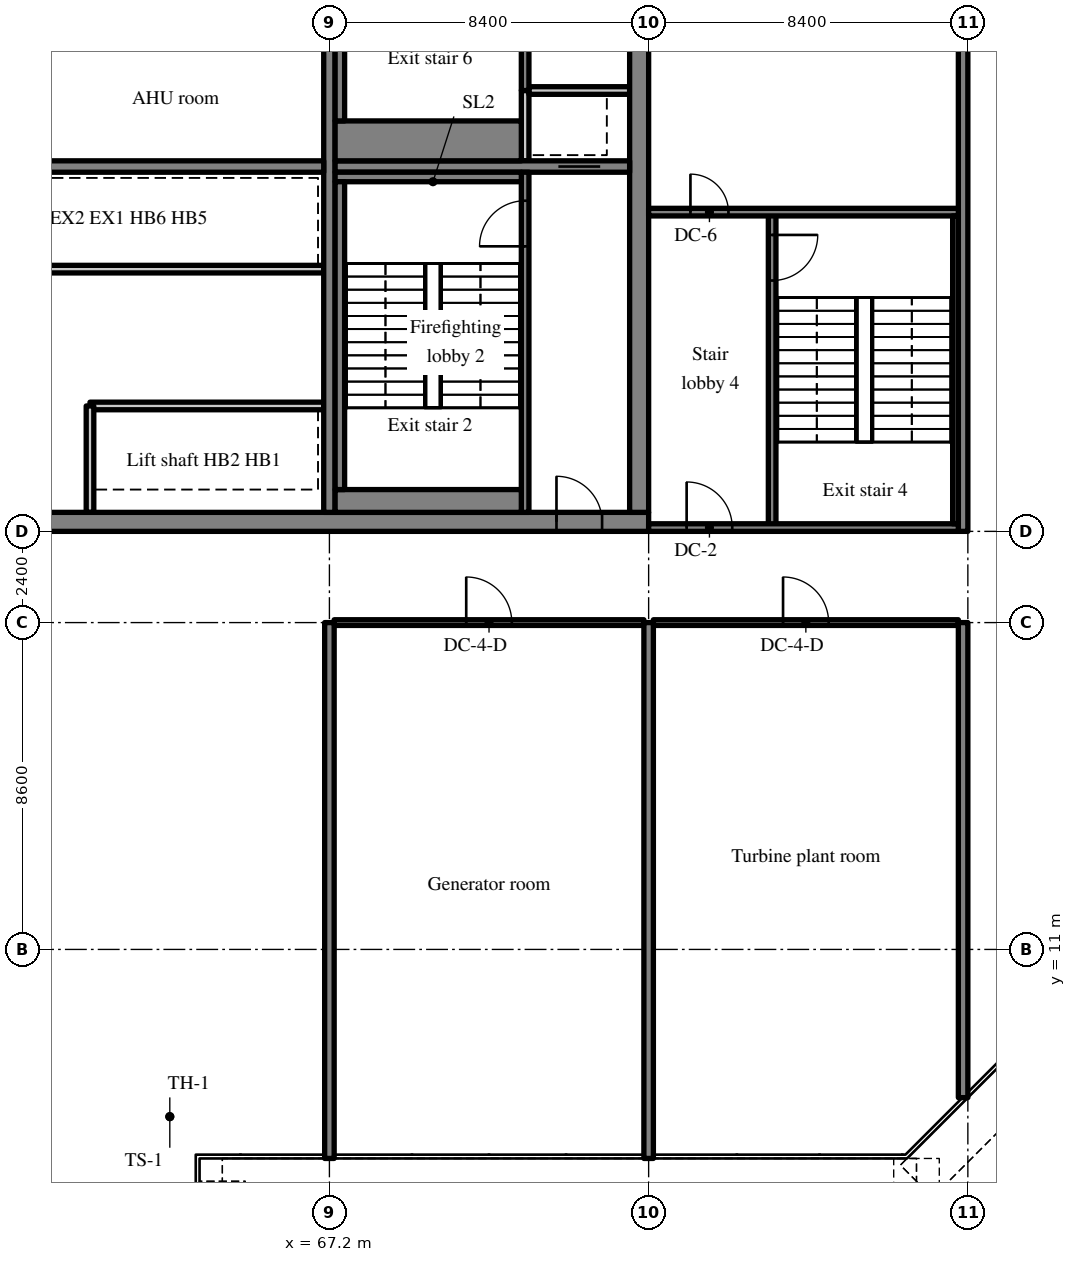
"""IFC4 building model, lengths in metres.
Left out: names, types, materials, properties, quantities, classifications, styles, units other than length and angle.
Written with IfcOpenShell. Run it as: python <this file> out.ifc"""

import sys

from ifc_helpers import new_model, si_unit, direction, frame, frame_2d, origin, place, context, subcontext, project, spatial, rectangle, extrude, source, transform, mapped, element, fill, save


model = new_model("IFC4")
c1 = context("Model", 3, precision=1e-05, world=origin(), true_north=direction((0.0, 1.0)))
c2 = subcontext(c1, "Body", "Model", "MODEL_VIEW")
j1 = project(units=[si_unit("LENGTHUNIT", "METRE"), si_unit("PLANEANGLEUNIT", "RADIAN")], contexts=[c1])
p1 = place(None, origin())
s1 = spatial("IfcSite", under=j1, at=p1, CompositionType="ELEMENT")
p2 = place(p1, origin())
s2 = spatial("IfcBuilding", under=s1, at=p2, CompositionType="ELEMENT")
p3 = place(p2, frame((0.0, 0.0, 317.7)))
s3 = spatial("IfcBuildingStorey", under=s2, at=p3, CompositionType="ELEMENT", Elevation=317.7)
m1 = source(origin(), c2, "Body", "SweptSolid", [
    extrude(rectangle(XDim=50.4, YDim=0.5, at=frame_2d((25.2, 0.0))), origin(), (0.0, 0.0, 1.0), 5.72),
])
p4 = place(p3, frame((25.2, 22.25, 0.0), z_axis=(0.0, 0.0, 1.0), x_axis=(1.0, 0.0, 0.0)))
e1 = element("IfcWall", 1, at=p4, inside=s3, PredefinedType="SHEAR", context=c2, shape_type="MappedRepresentation", body=[
    mapped(m1, transform((0.0, 0.0, 0.0), scale=1.0)),
])
m2 = source(origin(), c2, "Body", "SweptSolid", [
    extrude(rectangle(XDim=1.8, YDim=2.1, at=frame_2d((0.9, 1.05))), frame((0.0, 0.26, 0.0), z_axis=(0.0, -1.0, 0.0), x_axis=(1.0, 0.0, 0.0)), (0.0, 0.0, 1.0), 0.52),
])
p5 = place(p4, frame((15.9, 0.0, 0.0)))
e2 = element("IfcOpeningElement", 2, at=p5, cuts=e1, PredefinedType="OPENING", context=c2, shape_type="MappedRepresentation", body=[
    mapped(m2, transform((0.0, 0.0, 0.0), scale=1.0)),
])
m3 = source(origin(), c2, "Body", "SweptSolid", [
    extrude(rectangle(XDim=0.9, YDim=2.1, at=frame_2d((0.45, 1.05))), frame((0.0, 0.26, 0.0), z_axis=(0.0, -1.0, 0.0), x_axis=(1.0, 0.0, 0.0)), (0.0, 0.0, 1.0), 0.52),
])
p6 = place(p4, frame((21.525, 0.0, 0.0)))
e3 = element("IfcOpeningElement", 3, at=p6, cuts=e1, PredefinedType="OPENING", context=c2, shape_type="MappedRepresentation", body=[
    mapped(m3, transform((0.0, 0.0, 0.0), scale=1.0)),
])
p7 = place(p4, frame((32.7, 0.0, 0.0)))
e4 = element("IfcOpeningElement", 4, at=p7, cuts=e1, PredefinedType="OPENING", context=c2, shape_type="MappedRepresentation", body=[
    mapped(m2, transform((0.0, 0.0, 0.0), scale=1.0)),
])
m4 = source(origin(), c2, "Body", "SweptSolid", [
    extrude(rectangle(XDim=1.2, YDim=2.1, at=frame_2d((0.6, 1.05))), frame((0.0, 0.26, 0.0), z_axis=(0.0, -1.0, 0.0), x_axis=(1.0, 0.0, 0.0)), (0.0, 0.0, 1.0), 0.52),
])
p8 = place(p4, frame((6.5, 0.0, 0.0)))
e5 = element("IfcOpeningElement", 5, at=p8, cuts=e1, PredefinedType="OPENING", context=c2, shape_type="MappedRepresentation", body=[
    mapped(m4, transform((0.0, 0.0, 0.0), scale=1.0)),
])
p9 = place(p4, frame((47.975, 0.0, 0.0)))
e6 = element("IfcOpeningElement", 6, at=p9, cuts=e1, PredefinedType="OPENING", context=c2, shape_type="MappedRepresentation", body=[
    mapped(m4, transform((0.0, 0.0, 0.0), scale=1.0)),
])
m5 = source(origin(), c2, "Body", "SweptSolid", [
    extrude(rectangle(XDim=19.0, YDim=0.5, at=frame_2d((9.5, 0.0))), origin(), (0.0, 0.0, 1.0), 5.72),
])
p10 = place(p3, frame((75.35, 22.5, 0.0), z_axis=(0.0, 0.0, 1.0), x_axis=(0.0, 1.0, 0.0)))
e7 = element("IfcWall", 7, at=p10, inside=s3, PredefinedType="SHEAR", context=c2, shape_type="MappedRepresentation", body=[
    mapped(m5, transform((0.0, 0.0, 0.0), scale=1.0)),
])
p11 = place(p10, frame((12.9, 0.0, 0.0)))
e8 = element("IfcOpeningElement", 8, at=p11, cuts=e7, PredefinedType="OPENING", context=c2, shape_type="MappedRepresentation", body=[
    mapped(m4, transform((0.0, 0.0, 0.0), scale=1.0)),
])
m6 = source(origin(), c2, "Body", "SweptSolid", [
    extrude(rectangle(XDim=19.0, YDim=0.3, at=frame_2d((9.5, 0.0))), origin(), (0.0, 0.0, 1.0), 5.72),
])
p12 = place(p3, frame((67.2, 22.5, 0.0), z_axis=(0.0, 0.0, 1.0), x_axis=(0.0, 1.0, 0.0)))
e9 = element("IfcWall", 9, at=p12, inside=s3, PredefinedType="SHEAR", context=c2, shape_type="MappedRepresentation", body=[
    mapped(m6, transform((0.0, 0.0, 0.0), scale=1.0)),
])
m7 = source(origin(), c2, "Body", "SweptSolid", [
    extrude(rectangle(XDim=16.5, YDim=0.3, at=frame_2d((8.25, 0.0))), origin(), (0.0, 0.0, 1.0), 5.72),
])
p13 = place(p3, frame((50.55, 31.6, 0.0), z_axis=(0.0, 0.0, 1.0), x_axis=(1.0, 0.0, 0.0)))
e10 = element("IfcWall", 10, at=p13, inside=s3, PredefinedType="SHEAR", context=c2, shape_type="MappedRepresentation", body=[
    mapped(m7, transform((0.0, 0.0, 0.0), scale=1.0)),
])
m8 = source(origin(), c2, "Body", "SweptSolid", [
    extrude(rectangle(XDim=1.0, YDim=2.1, at=frame_2d((0.5, 1.05))), frame((0.0, 0.16, 0.0), z_axis=(0.0, -1.0, 0.0), x_axis=(1.0, 0.0, 0.0)), (0.0, 0.0, 1.0), 0.32),
])
p14 = place(p13, frame((0.625, 0.0, 0.0)))
e11 = element("IfcOpeningElement", 11, at=p14, cuts=e10, PredefinedType="OPENING", context=c2, shape_type="MappedRepresentation", body=[
    mapped(m8, transform((0.0, 0.0, 0.0), scale=1.0)),
])
m9 = source(origin(), c2, "Body", "SweptSolid", [
    extrude(rectangle(XDim=7.75, YDim=0.3, at=frame_2d((3.875, 0.0))), origin(), (0.0, 0.0, 1.0), 5.72),
])
p15 = place(p3, frame((67.35, 31.6, 0.0), z_axis=(0.0, 0.0, 1.0), x_axis=(1.0, 0.0, 0.0)))
e12 = element("IfcWall", 12, at=p15, inside=s3, PredefinedType="SHEAR", context=c2, shape_type="MappedRepresentation", body=[
    mapped(m9, transform((0.0, 0.0, 0.0), scale=1.0)),
])
m10 = source(origin(), c2, "Body", "SweptSolid", [
    extrude(rectangle(XDim=1.1, YDim=2.1, at=frame_2d((0.55, 1.05))), frame((0.0, 0.16, 0.0), z_axis=(0.0, -1.0, 0.0), x_axis=(1.0, 0.0, 0.0)), (0.0, 0.0, 1.0), 0.32),
])
p16 = place(p15, frame((5.875, 0.0, 0.0)))
e13 = element("IfcOpeningElement", 13, at=p16, cuts=e12, PredefinedType="OPENING", context=c2, shape_type="MappedRepresentation", body=[
    mapped(m10, transform((0.0, 0.0, 0.0), scale=1.0)),
])
m11 = source(origin(), c2, "Body", "SweptSolid", [
    extrude(rectangle(XDim=14.1, YDim=0.25, at=frame_2d((7.05, 0.0))), origin(), (0.0, 0.0, 1.0), 5.72),
])
for number, where, z_axis, x_axis in (
    (14, (67.2, 5.5, 0.0), (0.0, 0.0, 1.0), (0.0, 1.0, 0.0)),
    (15, (75.6, 5.5, 0.0), (0.0, 0.0, 1.0), (0.0, 1.0, 0.0)),
):
    element("IfcWall", number, at=place(p3, frame(where, z_axis=z_axis, x_axis=x_axis)), inside=s3, PredefinedType="SHEAR", context=c2, shape_type="MappedRepresentation", body=[
        mapped(m11, transform((0.0, 0.0, 0.0), scale=1.0)),
    ])
m12 = source(origin(), c2, "Body", "SweptSolid", [
    extrude(rectangle(XDim=12.5, YDim=0.25, at=frame_2d((6.25, 0.0))), origin(), (0.0, 0.0, 1.0), 5.72),
])
p17 = place(p3, frame((83.875, 7.1, 0.0), z_axis=(0.0, 0.0, 1.0), x_axis=(0.0, 1.0, 0.0)))
e16 = element("IfcWall", 16, at=p17, inside=s3, PredefinedType="SHEAR", context=c2, shape_type="MappedRepresentation", body=[
    mapped(m12, transform((0.0, 0.0, 0.0), scale=1.0)),
])
m13 = source(origin(), c2, "Body", "SweptSolid", [
    extrude(rectangle(XDim=18.4, YDim=0.25, at=frame_2d((9.2, 0.0))), origin(), (0.0, 0.0, 1.0), 5.72),
])
p18 = place(p3, frame((83.875, 22.0, 0.0), z_axis=(0.0, 0.0, 1.0), x_axis=(0.0, 1.0, 0.0)))
e17 = element("IfcWall", 17, at=p18, inside=s3, PredefinedType="SHEAR", context=c2, shape_type="MappedRepresentation", body=[
    mapped(m13, transform((0.0, 0.0, 0.0), scale=1.0)),
])
m14 = source(origin(), c2, "Body", "SweptSolid", [
    extrude(rectangle(XDim=6.15, YDim=0.2, at=frame_2d((3.075, 0.0))), origin(), (0.0, 0.0, 1.0), 5.72),
])
p19 = place(p3, frame((67.05, 25.3, 0.0), z_axis=(0.0, 0.0, 1.0), x_axis=(-1.0, 0.0, 0.0)))
e18 = element("IfcWall", 18, at=p19, inside=s3, PredefinedType="SOLIDWALL", context=c2, shape_type="MappedRepresentation", body=[
    mapped(m14, transform((0.0, 0.0, 0.0), scale=1.0)),
])
m15 = source(origin(), c2, "Body", "SweptSolid", [
    extrude(rectangle(XDim=12.15, YDim=0.2, at=frame_2d((6.075, 0.0))), origin(), (0.0, 0.0, 1.0), 5.72),
])
p20 = place(p3, frame((67.05, 28.9, 0.0), z_axis=(0.0, 0.0, 1.0), x_axis=(-1.0, 0.0, 0.0)))
e19 = element("IfcWall", 19, at=p20, inside=s3, PredefinedType="SOLIDWALL", context=c2, shape_type="MappedRepresentation", body=[
    mapped(m15, transform((0.0, 0.0, 0.0), scale=1.0)),
])
m16 = source(origin(), c2, "Body", "SweptSolid", [
    extrude(rectangle(XDim=2.8, YDim=0.2, at=frame_2d((1.4, 0.0))), origin(), (0.0, 0.0, 1.0), 5.72),
])
p21 = place(p3, frame((60.9, 22.5, 0.0), z_axis=(0.0, 0.0, 1.0), x_axis=(0.0, 1.0, 0.0)))
e20 = element("IfcWall", 20, at=p21, inside=s3, PredefinedType="SOLIDWALL", context=c2, shape_type="MappedRepresentation", body=[
    mapped(m16, transform((0.0, 0.0, 0.0), scale=1.0)),
])
m17 = source(origin(), c2, "Body", "SweptSolid", [
    extrude(rectangle(XDim=8.95, YDim=0.2, at=frame_2d((4.475, 0.0))), origin(), (0.0, 0.0, 1.0), 5.72),
])
p22 = place(p3, frame((72.35, 22.5, 0.0), z_axis=(0.0, 0.0, 1.0), x_axis=(0.0, 1.0, 0.0)))
e21 = element("IfcWall", 21, at=p22, inside=s3, PredefinedType="SOLIDWALL", context=c2, shape_type="MappedRepresentation", body=[
    mapped(m17, transform((0.0, 0.0, 0.0), scale=1.0)),
])
m18 = source(origin(), c2, "Body", "SweptSolid", [
    extrude(rectangle(XDim=1.2, YDim=2.1, at=frame_2d((0.6, 1.05))), frame((0.0, 0.11, 0.0), z_axis=(0.0, -1.0, 0.0), x_axis=(1.0, 0.0, 0.0)), (0.0, 0.0, 1.0), 0.22),
])
p23 = place(p22, frame((7.0, 0.0, 0.0)))
e22 = element("IfcOpeningElement", 22, at=p23, cuts=e21, PredefinedType="OPENING", context=c2, shape_type="MappedRepresentation", body=[
    mapped(m18, transform((0.0, 0.0, 0.0), scale=1.0)),
])
m19 = source(origin(), c2, "Body", "SweptSolid", [
    extrude(rectangle(XDim=1.85, YDim=0.2, at=frame_2d((0.925, 0.0))), origin(), (0.0, 0.0, 1.0), 5.72),
])
p24 = place(p3, frame((72.35, 31.75, 0.0), z_axis=(0.0, 0.0, 1.0), x_axis=(0.0, 1.0, 0.0)))
e23 = element("IfcWall", 23, at=p24, inside=s3, PredefinedType="SOLIDWALL", context=c2, shape_type="MappedRepresentation", body=[
    mapped(m19, transform((0.0, 0.0, 0.0), scale=1.0)),
])
m20 = source(origin(), c2, "Body", "SweptSolid", [
    extrude(rectangle(XDim=2.65, YDim=0.2, at=frame_2d((1.325, 0.0))), origin(), (0.0, 0.0, 1.0), 5.72),
])
p25 = place(p3, frame((72.45, 33.6, 0.0), z_axis=(0.0, 0.0, 1.0), x_axis=(1.0, 0.0, 0.0)))
e24 = element("IfcWall", 24, at=p25, inside=s3, PredefinedType="SOLIDWALL", context=c2, shape_type="MappedRepresentation", body=[
    mapped(m20, transform((0.0, 0.0, 0.0), scale=1.0)),
])
m21 = source(origin(), c2, "Body", "SweptSolid", [
    extrude(rectangle(XDim=7.9, YDim=0.2, at=frame_2d((3.95, 0.0))), origin(), (0.0, 0.0, 1.0), 5.72),
])
p26 = place(p3, frame((72.35, 33.6, 0.0), z_axis=(0.0, 0.0, 1.0), x_axis=(0.0, 1.0, 0.0)))
e25 = element("IfcWall", 25, at=p26, inside=s3, PredefinedType="SOLIDWALL", context=c2, shape_type="MappedRepresentation", body=[
    mapped(m21, transform((0.0, 0.0, 0.0), scale=1.0)),
])
m22 = source(origin(), c2, "Body", "SweptSolid", [
    extrude(rectangle(XDim=1.8, YDim=2.1, at=frame_2d((0.9, 1.05))), frame((0.0, 0.11, 0.0), z_axis=(0.0, -1.0, 0.0), x_axis=(1.0, 0.0, 0.0)), (0.0, 0.0, 1.0), 0.22),
])
p27 = place(p26, frame((5.3, 0.0, 0.0)))
e26 = element("IfcOpeningElement", 26, at=p27, cuts=e25, PredefinedType="OPENING", context=c2, shape_type="MappedRepresentation", body=[
    mapped(m22, transform((0.0, 0.0, 0.0), scale=1.0)),
])
m23 = source(origin(), c2, "Body", "SweptSolid", [
    extrude(rectangle(XDim=8.3, YDim=0.2, at=frame_2d((4.15, 0.0))), origin(), (0.0, 0.0, 1.0), 5.72),
])
p28 = place(p3, frame((78.85, 22.1, 0.0), z_axis=(0.0, 0.0, 1.0), x_axis=(0.0, 1.0, 0.0)))
e27 = element("IfcWall", 27, at=p28, inside=s3, PredefinedType="SOLIDWALL", context=c2, shape_type="MappedRepresentation", body=[
    mapped(m23, transform((0.0, 0.0, 0.0), scale=1.0)),
])
p29 = place(p28, frame((6.5, 0.0, 0.0)))
e28 = element("IfcOpeningElement", 28, at=p29, cuts=e27, PredefinedType="OPENING", context=c2, shape_type="MappedRepresentation", body=[
    mapped(m18, transform((0.0, 0.0, 0.0), scale=1.0)),
])
m24 = source(origin(), c2, "Body", "SweptSolid", [
    extrude(rectangle(XDim=8.15, YDim=0.2, at=frame_2d((4.075, 0.0))), origin(), (0.0, 0.0, 1.0), 5.72),
])
p30 = place(p3, frame((83.75, 22.1, 0.0), z_axis=(0.0, 0.0, 1.0), x_axis=(-1.0, 0.0, 0.0)))
e29 = element("IfcWall", 29, at=p30, inside=s3, PredefinedType="SOLIDWALL", context=c2, shape_type="MappedRepresentation", body=[
    mapped(m24, transform((0.0, 0.0, 0.0), scale=1.0)),
])
p31 = place(p30, frame((5.95, 0.0, 0.0)))
e30 = element("IfcOpeningElement", 30, at=p31, cuts=e29, PredefinedType="OPENING", context=c2, shape_type="MappedRepresentation", body=[
    mapped(m18, transform((0.0, 0.0, 0.0), scale=1.0)),
])
p32 = place(p3, frame((83.75, 30.4, 0.0), z_axis=(0.0, 0.0, 1.0), x_axis=(-1.0, 0.0, 0.0)))
e31 = element("IfcWall", 31, at=p32, inside=s3, PredefinedType="SOLIDWALL", context=c2, shape_type="MappedRepresentation", body=[
    mapped(m24, transform((0.0, 0.0, 0.0), scale=1.0)),
])
m25 = source(origin(), c2, "Body", "SweptSolid", [
    extrude(rectangle(XDim=1.0, YDim=2.1, at=frame_2d((0.5, 1.05))), frame((0.0, 0.11, 0.0), z_axis=(0.0, -1.0, 0.0), x_axis=(1.0, 0.0, 0.0)), (0.0, 0.0, 1.0), 0.22),
])
p33 = place(p32, frame((6.05, 0.0, 0.0)))
e32 = element("IfcOpeningElement", 32, at=p33, cuts=e31, PredefinedType="OPENING", context=c2, shape_type="MappedRepresentation", body=[
    mapped(m25, transform((0.0, 0.0, 0.0), scale=1.0)),
])
m26 = source(origin(), c2, "Body", "SweptSolid", [
    extrude(rectangle(XDim=4.9, YDim=0.6, at=frame_2d((2.45, 0.0))), origin(), (0.0, 0.0, 1.0), 5.72),
])
p34 = place(p3, frame((67.35, 22.8, 0.0), z_axis=(0.0, 0.0, 1.0), x_axis=(1.0, 0.0, 0.0)))
e33 = element("IfcWall", 33, at=p34, inside=s3, PredefinedType="SOLIDWALL", context=c2, shape_type="MappedRepresentation", body=[
    mapped(m26, transform((0.0, 0.0, 0.0), scale=1.0)),
])
m27 = source(origin(), c2, "Body", "SweptSolid", [
    extrude(rectangle(XDim=4.9, YDim=0.25, at=frame_2d((2.45, 0.0))), origin(), (0.0, 0.0, 1.0), 5.72),
])
p35 = place(p3, frame((67.35, 31.325, 0.0), z_axis=(0.0, 0.0, 1.0), x_axis=(1.0, 0.0, 0.0)))
e34 = element("IfcWall", 34, at=p35, inside=s3, PredefinedType="SOLIDWALL", context=c2, shape_type="MappedRepresentation", body=[
    mapped(m27, transform((0.0, 0.0, 0.0), scale=1.0)),
])
m28 = source(origin(), c2, "Body", "SweptSolid", [
    extrude(rectangle(XDim=8.1, YDim=0.25, at=frame_2d((4.05, 0.0))), origin(), (0.0, 0.0, 1.0), 5.72),
])
p36 = place(p3, frame((67.475, 23.1, 0.0), z_axis=(0.0, 0.0, 1.0), x_axis=(0.0, 1.0, 0.0)))
e35 = element("IfcWall", 35, at=p36, inside=s3, PredefinedType="SOLIDWALL", context=c2, shape_type="MappedRepresentation", body=[
    mapped(m28, transform((0.0, 0.0, 0.0), scale=1.0)),
])
m29 = source(origin(), c2, "Body", "SweptSolid", [
    extrude(rectangle(XDim=4.9, YDim=1.05, at=frame_2d((2.45, 0.0))), origin(), (0.0, 0.0, 1.0), 5.72),
])
p37 = place(p3, frame((67.35, 32.275, 0.0), z_axis=(0.0, 0.0, 1.0), x_axis=(1.0, 0.0, 0.0)))
e36 = element("IfcWall", 36, at=p37, inside=s3, PredefinedType="SOLIDWALL", context=c2, shape_type="MappedRepresentation", body=[
    mapped(m29, transform((0.0, 0.0, 0.0), scale=1.0)),
])
p38 = place(p3, frame((67.475, 32.8, 0.0), z_axis=(0.0, 0.0, 1.0), x_axis=(0.0, 1.0, 0.0)))
e37 = element("IfcWall", 37, at=p38, inside=s3, PredefinedType="SOLIDWALL", context=c2, shape_type="MappedRepresentation", body=[
    mapped(m28, transform((0.0, 0.0, 0.0), scale=1.0)),
])
m30 = source(origin(), c2, "Body", "SweptSolid", [
    extrude(rectangle(XDim=8.1, YDim=0.15, at=frame_2d((4.05, 0.0))), origin(), (0.0, 0.0, 1.0), 5.72),
])
p39 = place(p3, frame((83.675, 22.2, 0.0), z_axis=(0.0, 0.0, 1.0), x_axis=(0.0, 1.0, 0.0)))
e38 = element("IfcWall", 38, at=p39, inside=s3, PredefinedType="SOLIDWALL", context=c2, shape_type="MappedRepresentation", body=[
    mapped(m30, transform((0.0, 0.0, 0.0), scale=1.0)),
])
m31 = source(origin(), c2, "Body", "SweptSolid", [
    extrude(rectangle(XDim=8.15, YDim=0.15, at=frame_2d((4.075, 0.0))), origin(), (0.0, 0.0, 1.0), 4.97),
])
p40 = place(p3, frame((67.325, 19.6, 0.0), z_axis=(0.0, 0.0, 1.0), x_axis=(1.0, 0.0, 0.0)))
e39 = element("IfcWall", 39, at=p40, inside=s3, PredefinedType="PARTITIONING", context=c2, shape_type="MappedRepresentation", body=[
    mapped(m31, transform((0.0, 0.0, 0.0), scale=1.0)),
])
m32 = source(origin(), c2, "Body", "SweptSolid", [
    extrude(rectangle(XDim=1.2, YDim=2.1, at=frame_2d((0.6, 1.05))), frame((0.0, 0.085, 0.0), z_axis=(0.0, -1.0, 0.0), x_axis=(1.0, 0.0, 0.0)), (0.0, 0.0, 1.0), 0.17),
])
p41 = place(p40, frame((3.475, 0.0, 0.0)))
e40 = element("IfcOpeningElement", 40, at=p41, cuts=e39, PredefinedType="OPENING", context=c2, shape_type="MappedRepresentation", body=[
    mapped(m32, transform((0.0, 0.0, 0.0), scale=1.0)),
])
m33 = source(origin(), c2, "Body", "SweptSolid", [
    extrude(rectangle(XDim=8.025, YDim=0.15, at=frame_2d((4.012, 0.0))), origin(), (0.0, 0.0, 1.0), 4.97),
])
p42 = place(p3, frame((75.725, 19.6, 0.0), z_axis=(0.0, 0.0, 1.0), x_axis=(1.0, 0.0, 0.0)))
e41 = element("IfcWall", 41, at=p42, inside=s3, PredefinedType="PARTITIONING", context=c2, shape_type="MappedRepresentation", body=[
    mapped(m33, transform((0.0, 0.0, 0.0), scale=1.0)),
])
p43 = place(p42, frame((3.412, 0.0, 0.0)))
e42 = element("IfcOpeningElement", 42, at=p43, cuts=e41, PredefinedType="OPENING", context=c2, shape_type="MappedRepresentation", body=[
    mapped(m32, transform((0.0, 0.0, 0.0), scale=1.0)),
])
m34 = source(origin(), c2, "Body", "SweptSolid", [
    extrude(rectangle(XDim=1.2, YDim=2.1, at=frame_2d((0.6, 1.05))), frame((0.0, 0.025, 0.0), z_axis=(0.0, -1.0, 0.0), x_axis=(1.0, 0.0, 0.0)), (0.0, 0.0, 1.0), 0.05),
])
p44 = place(p23, origin())
e43 = element("IfcDoor", 43, at=p44, inside=s3, OperationType="SINGLE_SWING_LEFT", PredefinedType="DOOR", context=c2, shape_type="MappedRepresentation", body=[
    mapped(m34, transform((0.0, 0.0, 0.0), scale=1.0)),
])
fill(e22, e43)
m35 = source(origin(), c2, "Body", "SweptSolid", [
    extrude(rectangle(XDim=1.2, YDim=2.1, at=frame_2d((0.6, 1.05))), frame((0.0, 0.175, 0.0), z_axis=(0.0, -1.0, 0.0), x_axis=(1.0, 0.0, 0.0)), (0.0, 0.0, 1.0), 0.05),
])
p45 = place(p9, origin())
e44 = element("IfcDoor", 44, at=p45, inside=s3, OperationType="SINGLE_SWING_LEFT", PredefinedType="DOOR", context=c2, shape_type="MappedRepresentation", body=[
    mapped(m35, transform((0.0, 0.0, 0.0), scale=1.0)),
])
fill(e6, e44)
m36 = source(origin(), c2, "Body", "SweptSolid", [
    extrude(rectangle(XDim=1.1, YDim=2.1, at=frame_2d((0.55, 1.05))), frame((0.0, 0.025, 0.0), z_axis=(0.0, -1.0, 0.0), x_axis=(1.0, 0.0, 0.0)), (0.0, 0.0, 1.0), 0.05),
])
p46 = place(p16, origin())
e45 = element("IfcDoor", 45, at=p46, inside=s3, OperationType="SLIDING_TO_RIGHT", PredefinedType="DOOR", context=c2, shape_type="MappedRepresentation", body=[
    mapped(m36, transform((0.0, 0.0, 0.0), scale=1.0)),
])
fill(e13, e45)
p47 = place(p29, origin())
e46 = element("IfcDoor", 46, at=p47, inside=s3, OperationType="SINGLE_SWING_RIGHT", PredefinedType="DOOR", context=c2, shape_type="MappedRepresentation", body=[
    mapped(m34, transform((0.0, 0.0, 0.0), scale=1.0)),
])
fill(e28, e46)
p48 = place(p31, origin())
e47 = element("IfcDoor", 47, at=p48, inside=s3, OperationType="SINGLE_SWING_RIGHT", PredefinedType="DOOR", context=c2, shape_type="MappedRepresentation", body=[
    mapped(m34, transform((0.0, 0.0, 0.0), scale=1.0)),
])
fill(e30, e47)
m37 = source(origin(), c2, "Body", "SweptSolid", [
    extrude(rectangle(XDim=1.0, YDim=2.1, at=frame_2d((0.5, 1.05))), frame((0.0, 0.025, 0.0), z_axis=(0.0, -1.0, 0.0), x_axis=(1.0, 0.0, 0.0)), (0.0, 0.0, 1.0), 0.05),
])
p49 = place(p33, origin())
e48 = element("IfcDoor", 48, at=p49, inside=s3, OperationType="SINGLE_SWING_RIGHT", PredefinedType="DOOR", context=c2, shape_type="MappedRepresentation", body=[
    mapped(m37, transform((0.0, 0.0, 0.0), scale=1.0)),
])
fill(e32, e48)
p50 = place(p41, origin())
e49 = element("IfcDoor", 49, at=p50, inside=s3, OperationType="SINGLE_SWING_LEFT", PredefinedType="DOOR", context=c2, shape_type="MappedRepresentation", body=[
    mapped(m34, transform((0.0, 0.0, 0.0), scale=1.0)),
])
fill(e40, e49)
p51 = place(p43, origin())
e50 = element("IfcDoor", 50, at=p51, inside=s3, OperationType="SINGLE_SWING_LEFT", PredefinedType="DOOR", context=c2, shape_type="MappedRepresentation", body=[
    mapped(m34, transform((0.0, 0.0, 0.0), scale=1.0)),
])
fill(e42, e50)
save(model, sys.argv[1])
